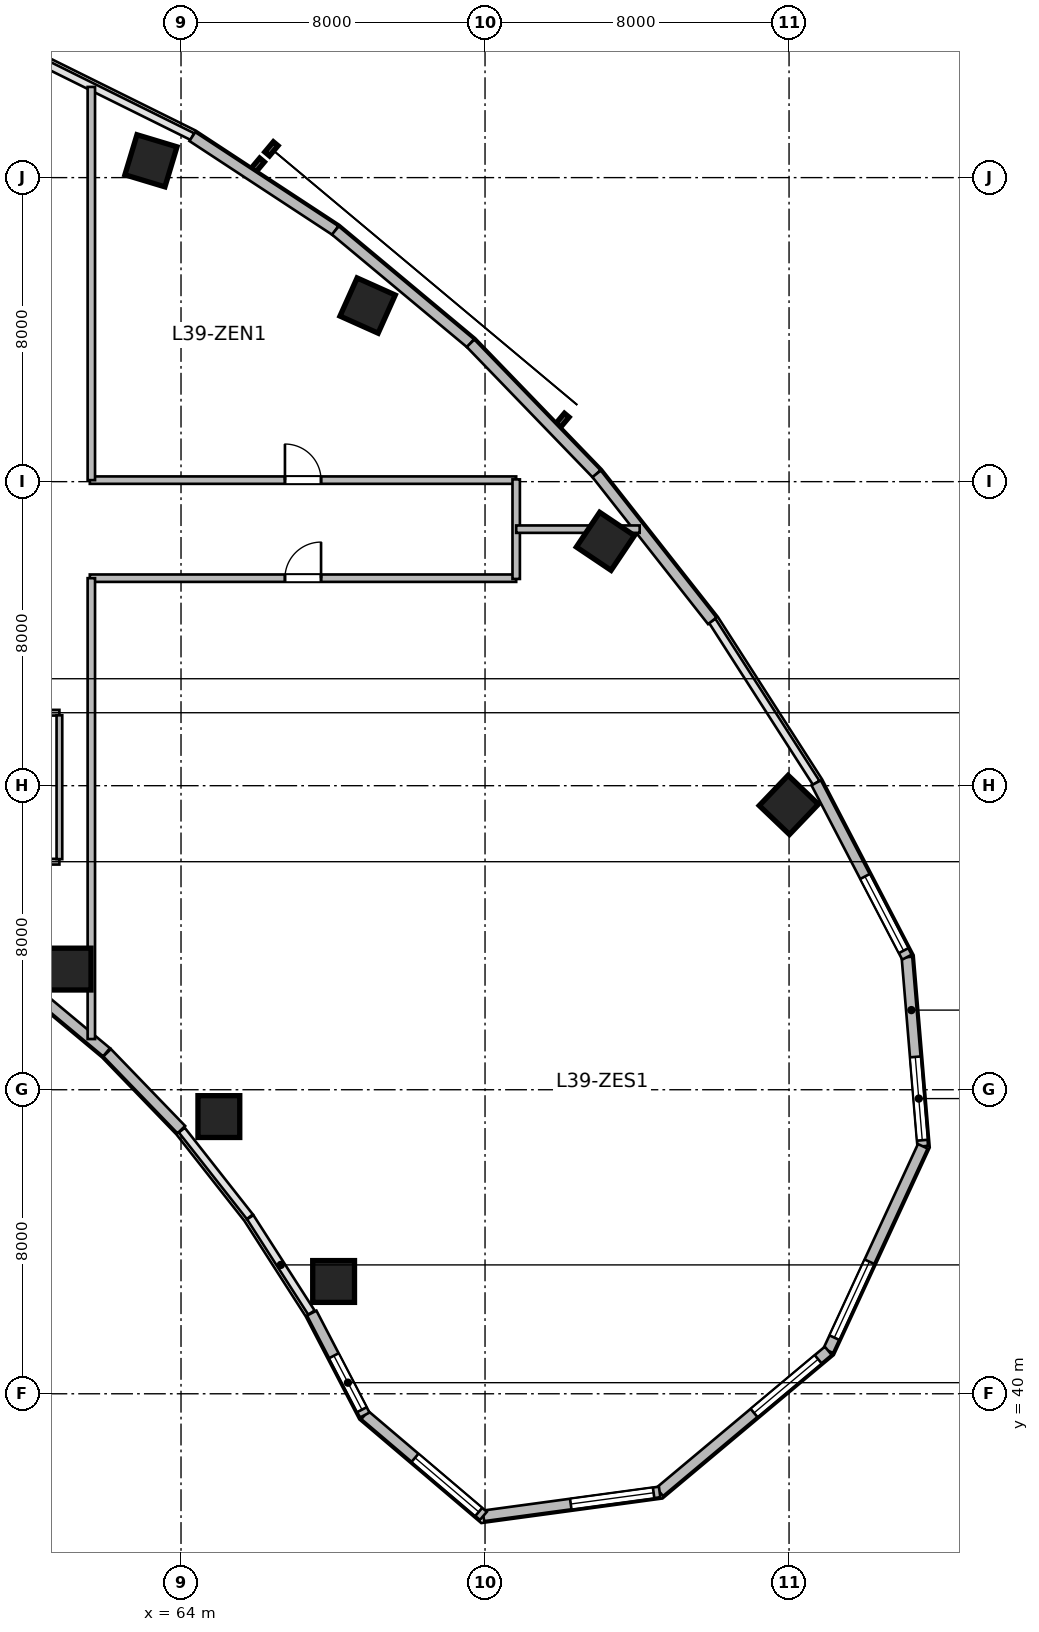
"""IFC4 building model, lengths in metres.
Left out: names, types, materials, properties, quantities, classifications, styles, units other than length and angle.
Written with IfcOpenShell. Run it as: python <this file> out.ifc"""

import sys

from ifc_helpers import new_model, si_unit, direction, frame, frame_2d, origin, origin_2d, place, context, subcontext, project, spatial, rectangle, circle, extrude, source, transform, mapped, element, fill, save


model = new_model("IFC4")
c1 = context("Model", 3, precision=1e-05, world=origin(), true_north=direction((0.0, 1.0)))
c2 = subcontext(c1, "Body", "Model", "MODEL_VIEW")
j1 = project(units=[si_unit("LENGTHUNIT", "METRE"), si_unit("PLANEANGLEUNIT", "RADIAN")], contexts=[c1])
p1 = place(None, origin())
s1 = spatial("IfcSite", under=j1, at=p1, CompositionType="ELEMENT")
p2 = place(p1, origin())
s2 = spatial("IfcBuilding", under=s1, at=p2, CompositionType="ELEMENT")
p3 = place(p2, frame((0.0, 0.0, 162.3)))
s3 = spatial("IfcBuildingStorey", under=s2, at=p3, CompositionType="ELEMENT", Elevation=162.3)
m1 = source(origin(), c2, "Body", "SweptSolid", [
    extrude(rectangle(XDim=1.1, YDim=1.1, at=origin_2d()), origin(), (0.0, 0.0, 1.0), 3.9),
])
p4 = place(p3, frame((63.209, 72.442, 0.0), z_axis=(0.0, 0.0, 1.0), x_axis=(0.288697611798, 0.957420330337, 0.0)))
e1 = element("IfcColumn", 1, at=p4, inside=s3, PredefinedType="COLUMN", context=c2, shape_type="MappedRepresentation", body=[
    mapped(m1, transform((0.0, 0.0, 0.0), scale=1.0)),
])
m2 = source(origin(), c2, "Body", "SweptSolid", [
    extrude(circle(Radius=0.55, at=origin_2d()), origin(), (0.0, 0.0, 1.0), 3.9),
])
p5 = place(p3, frame((61.082, 51.175, 0.0), z_axis=(0.0, 0.0, 1.0), x_axis=(0.409126902895, 0.912477494148, 0.0)))
e2 = element("IfcColumn", 2, at=p5, inside=s3, PredefinedType="COLUMN", context=c2, shape_type="MappedRepresentation", body=[
    mapped(m2, transform((0.0, 0.0, 0.0), scale=1.0)),
])
p6 = place(p3, frame((68.91, 68.633, 0.0), z_axis=(0.0, 0.0, 1.0), x_axis=(0.409126902895, 0.912477494148, 0.0)))
e3 = element("IfcColumn", 3, at=p6, inside=s3, PredefinedType="COLUMN", context=c2, shape_type="MappedRepresentation", body=[
    mapped(m1, transform((0.0, 0.0, 0.0), scale=1.0)),
])
p7 = place(p3, frame((64.996, 47.294, 0.0), z_axis=(0.0, 0.0, 1.0), x_axis=(0.55774510898, 0.830012285095, 0.0)))
e4 = element("IfcColumn", 4, at=p7, inside=s3, PredefinedType="COLUMN", context=c2, shape_type="MappedRepresentation", body=[
    mapped(m2, transform((0.0, 0.0, 0.0), scale=1.0)),
])
p8 = place(p3, frame((75.167, 62.43, 0.0), z_axis=(0.0, 0.0, 1.0), x_axis=(0.55774510898, 0.830012285095, 0.0)))
e5 = element("IfcColumn", 5, at=p8, inside=s3, PredefinedType="COLUMN", context=c2, shape_type="MappedRepresentation", body=[
    mapped(m1, transform((0.0, 0.0, 0.0), scale=1.0)),
])
p9 = place(p3, frame((68.015, 42.955, 0.0), z_axis=(0.0, 0.0, 1.0), x_axis=(0.690756218984, 0.723087716626, 0.0)))
e6 = element("IfcColumn", 6, at=p9, inside=s3, PredefinedType="COLUMN", context=c2, shape_type="MappedRepresentation", body=[
    mapped(m2, transform((0.0, 0.0, 0.0), scale=1.0)),
])
p10 = place(p3, frame((79.993, 55.494, 0.0), z_axis=(0.0, 0.0, 1.0), x_axis=(0.690756218984, 0.723087716626, 0.0)))
e7 = element("IfcColumn", 7, at=p10, inside=s3, PredefinedType="COLUMN", context=c2, shape_type="MappedRepresentation", body=[
    mapped(m1, transform((0.0, 0.0, 0.0), scale=1.0)),
])
m3 = source(origin(), c2, "Body", "SweptSolid", [
    extrude(rectangle(XDim=4.994, YDim=0.28, at=frame_2d((2.497, 0.0))), origin(), (0.0, 0.0, 1.0), 3.65),
])
p11 = place(p3, frame((83.102, 51.489, 0.0), z_axis=(0.0, 0.0, 1.0), x_axis=(0.083344839916, -0.996520766296, 0.0)))
e8 = element("IfcWall", 8, at=p11, inside=s3, PredefinedType="SOLIDWALL", context=c2, shape_type="MappedRepresentation", body=[
    mapped(m3, transform((0.0, 0.0, 0.0), scale=1.0)),
])
p12 = place(p11, frame((2.635, 0.0, 0.95)))
e9 = element("IfcOpeningElement", 9, at=p12, cuts=e8, PredefinedType="OPENING", context=c2, shape_type="SweptSolid", body=[
    extrude(rectangle(XDim=2.2, YDim=2.1, at=frame_2d((1.1, 1.05))), frame((0.0, 0.15, 0.0), z_axis=(0.0, -1.0, 0.0), x_axis=(1.0, 0.0, 0.0)), (0.0, 0.0, 1.0), 0.3),
])
m4 = source(origin(), c2, "Body", "SweptSolid", [
    extrude(rectangle(XDim=5.927, YDim=0.28, at=frame_2d((2.964, 0.0))), origin(), (0.0, 0.0, 1.0), 3.65),
])
p13 = place(p3, frame((83.519, 46.512, 0.0), z_axis=(0.0, 0.0, 1.0), x_axis=(-0.419656204795, -0.907683132914, 0.0)))
e10 = element("IfcWall", 10, at=p13, inside=s3, PredefinedType="SOLIDWALL", context=c2, shape_type="MappedRepresentation", body=[
    mapped(m4, transform((0.0, 0.0, 0.0), scale=1.0)),
])
p14 = place(p13, frame((3.346, 0.0, 0.95)))
e11 = element("IfcOpeningElement", 11, at=p14, cuts=e10, PredefinedType="OPENING", context=c2, shape_type="SweptSolid", body=[
    extrude(rectangle(XDim=2.2, YDim=2.1, at=frame_2d((1.1, 1.05))), frame((0.0, 0.15, 0.0), z_axis=(0.0, -1.0, 0.0), x_axis=(1.0, 0.0, 0.0)), (0.0, 0.0, 1.0), 0.3),
])
m5 = source(origin(), c2, "Body", "SweptSolid", [
    extrude(rectangle(XDim=5.786, YDim=0.28, at=frame_2d((2.893, 0.0))), origin(), (0.0, 0.0, 1.0), 3.65),
])
p15 = place(p3, frame((81.031, 41.131, 0.0), z_axis=(0.0, 0.0, 1.0), x_axis=(-0.766711306852, -0.641992034176, 0.0)))
e12 = element("IfcWall", 12, at=p15, inside=s3, PredefinedType="SOLIDWALL", context=c2, shape_type="MappedRepresentation", body=[
    mapped(m5, transform((0.0, 0.0, 0.0), scale=1.0)),
])
p16 = place(p15, frame((0.347, 0.0, 0.95)))
e13 = element("IfcOpeningElement", 13, at=p16, cuts=e12, PredefinedType="OPENING", context=c2, shape_type="SweptSolid", body=[
    extrude(rectangle(XDim=2.2, YDim=2.1, at=frame_2d((1.1, 1.05))), frame((0.0, 0.15, 0.0), z_axis=(0.0, -1.0, 0.0), x_axis=(1.0, 0.0, 0.0)), (0.0, 0.0, 1.0), 0.3),
])
m6 = source(origin(), c2, "Body", "SweptSolid", [
    extrude(rectangle(XDim=4.68, YDim=0.28, at=frame_2d((2.34, 0.0))), origin(), (0.0, 0.0, 1.0), 3.65),
])
p17 = place(p3, frame((76.594, 37.417, 0.0), z_axis=(0.0, 0.0, 1.0), x_axis=(-0.990931146435, -0.134370618162, 0.0)))
e14 = element("IfcWall", 14, at=p17, inside=s3, PredefinedType="SOLIDWALL", context=c2, shape_type="MappedRepresentation", body=[
    mapped(m6, transform((0.0, 0.0, 0.0), scale=1.0)),
])
p18 = place(p17, frame((0.16, 0.0, 0.95)))
e15 = element("IfcOpeningElement", 15, at=p18, cuts=e14, PredefinedType="OPENING", context=c2, shape_type="SweptSolid", body=[
    extrude(rectangle(XDim=2.2, YDim=2.1, at=frame_2d((1.1, 1.05))), frame((0.0, 0.15, 0.0), z_axis=(0.0, -1.0, 0.0), x_axis=(1.0, 0.0, 0.0)), (0.0, 0.0, 1.0), 0.3),
])
m7 = source(origin(), c2, "Body", "SweptSolid", [
    extrude(rectangle(XDim=4.096, YDim=0.28, at=frame_2d((2.048, 0.0))), origin(), (0.0, 0.0, 1.0), 3.65),
])
p19 = place(p3, frame((71.957, 36.788, 0.0), z_axis=(0.0, 0.0, 1.0), x_axis=(-0.761926081737, 0.647663991564, 0.0)))
e16 = element("IfcWall", 16, at=p19, inside=s3, PredefinedType="SOLIDWALL", context=c2, shape_type="MappedRepresentation", body=[
    mapped(m7, transform((0.0, 0.0, 0.0), scale=1.0)),
])
p20 = place(p19, frame((0.16, 0.0, 0.95)))
e17 = element("IfcOpeningElement", 17, at=p20, cuts=e16, PredefinedType="OPENING", context=c2, shape_type="SweptSolid", body=[
    extrude(rectangle(XDim=2.2, YDim=2.1, at=frame_2d((1.1, 1.05))), frame((0.0, 0.15, 0.0), z_axis=(0.0, -1.0, 0.0), x_axis=(1.0, 0.0, 0.0)), (0.0, 0.0, 1.0), 0.3),
])
m8 = source(origin(), c2, "Body", "SweptSolid", [
    extrude(rectangle(XDim=3.024, YDim=0.28, at=frame_2d((1.512, 0.0))), origin(), (0.0, 0.0, 1.0), 3.65),
])
p21 = place(p3, frame((68.836, 39.44, 0.0), z_axis=(0.0, 0.0, 1.0), x_axis=(-0.461718746531, 0.887026380161, 0.0)))
e18 = element("IfcWall", 18, at=p21, inside=s3, PredefinedType="SOLIDWALL", context=c2, shape_type="MappedRepresentation", body=[
    mapped(m8, transform((0.0, 0.0, 0.0), scale=1.0)),
])
p22 = place(p21, frame((0.16, 0.0, 0.95)))
e19 = element("IfcOpeningElement", 19, at=p22, cuts=e18, PredefinedType="OPENING", context=c2, shape_type="SweptSolid", body=[
    extrude(rectangle(XDim=1.6, YDim=1.9, at=frame_2d((0.8, 0.95))), frame((0.0, 0.15, 0.0), z_axis=(0.0, -1.0, 0.0), x_axis=(1.0, 0.0, 0.0)), (0.0, 0.0, 1.0), 0.3),
])
m9 = source(origin(), c2, "Body", "SweptSolid", [
    extrude(rectangle(XDim=2.812, YDim=0.28, at=frame_2d((1.406, 0.0))), origin(), (0.0, 0.0, 1.0), 3.65),
])
p23 = place(p3, frame((64.008, 46.95, 0.0), z_axis=(0.0, 0.0, 1.0), x_axis=(-0.694583668785, 0.719411931411, 0.0)))
e20 = element("IfcWall", 20, at=p23, inside=s3, PredefinedType="SOLIDWALL", context=c2, shape_type="MappedRepresentation", body=[
    mapped(m9, transform((0.0, 0.0, 0.0), scale=1.0)),
])
m10 = source(origin(), c2, "Body", "SweptSolid", [
    extrude(rectangle(XDim=2.729, YDim=0.28, at=frame_2d((1.365, 0.0))), origin(), (0.0, 0.0, 1.0), 3.65),
])
p24 = place(p3, frame((62.041, 48.987, 0.0), z_axis=(0.0, 0.0, 1.0), x_axis=(-0.767957284255, 0.640501061326, 0.0)))
e21 = element("IfcWall", 21, at=p24, inside=s3, PredefinedType="SOLIDWALL", context=c2, shape_type="MappedRepresentation", body=[
    mapped(m10, transform((0.0, 0.0, 0.0), scale=1.0)),
])
m11 = source(origin(), c2, "Body", "SweptSolid", [
    extrude(rectangle(XDim=4.501, YDim=0.28, at=frame_2d((2.25, 0.0))), origin(), (0.0, 0.0, 1.0), 3.65),
])
p25 = place(p3, frame((64.298, 73.08, 0.0), z_axis=(0.0, 0.0, 1.0), x_axis=(0.835984920737, -0.548752414391, 0.0)))
e22 = element("IfcWall", 22, at=p25, inside=s3, PredefinedType="SOLIDWALL", context=c2, shape_type="MappedRepresentation", body=[
    mapped(m11, transform((0.0, 0.0, 0.0), scale=1.0)),
])
m12 = source(origin(), c2, "Body", "SweptSolid", [
    extrude(rectangle(XDim=4.634, YDim=0.28, at=frame_2d((2.317, 0.0))), origin(), (0.0, 0.0, 1.0), 3.65),
])
p26 = place(p3, frame((68.061, 70.61, 0.0), z_axis=(0.0, 0.0, 1.0), x_axis=(0.767910229096, -0.640557475993, 0.0)))
e23 = element("IfcWall", 23, at=p26, inside=s3, PredefinedType="SOLIDWALL", context=c2, shape_type="MappedRepresentation", body=[
    mapped(m12, transform((0.0, 0.0, 0.0), scale=1.0)),
])
m13 = source(origin(), c2, "Body", "SweptSolid", [
    extrude(rectangle(XDim=4.776, YDim=0.28, at=frame_2d((2.388, 0.0))), origin(), (0.0, 0.0, 1.0), 3.65),
])
p27 = place(p3, frame((71.619, 67.642, 0.0), z_axis=(0.0, 0.0, 1.0), x_axis=(0.694601811851, -0.719394414055, 0.0)))
e24 = element("IfcWall", 24, at=p27, inside=s3, PredefinedType="SOLIDWALL", context=c2, shape_type="MappedRepresentation", body=[
    mapped(m13, transform((0.0, 0.0, 0.0), scale=1.0)),
])
m14 = source(origin(), c2, "Body", "SweptSolid", [
    extrude(rectangle(XDim=4.922, YDim=0.28, at=frame_2d((2.461, 0.0))), origin(), (0.0, 0.0, 1.0), 3.65),
])
p28 = place(p3, frame((74.936, 64.206, 0.0), z_axis=(0.0, 0.0, 1.0), x_axis=(0.61817639101, -0.786039407153, 0.0)))
e25 = element("IfcWall", 25, at=p28, inside=s3, PredefinedType="SOLIDWALL", context=c2, shape_type="MappedRepresentation", body=[
    mapped(m14, transform((0.0, 0.0, 0.0), scale=1.0)),
])
m15 = source(origin(), c2, "Body", "SweptSolid", [
    extrude(rectangle(XDim=5.171, YDim=0.28, at=frame_2d((2.585, 0.0))), origin(), (0.0, 0.0, 1.0), 3.65),
])
p29 = place(p3, frame((80.715, 56.075, 0.0), z_axis=(0.0, 0.0, 1.0), x_axis=(0.461752581363, -0.887008767491, 0.0)))
e26 = element("IfcWall", 26, at=p29, inside=s3, PredefinedType="SOLIDWALL", context=c2, shape_type="MappedRepresentation", body=[
    mapped(m15, transform((0.0, 0.0, 0.0), scale=1.0)),
])
p30 = place(p29, frame((2.778, 0.0, 0.95)))
e27 = element("IfcOpeningElement", 27, at=p30, cuts=e26, PredefinedType="OPENING", context=c2, shape_type="SweptSolid", body=[
    extrude(rectangle(XDim=2.2, YDim=2.1, at=frame_2d((1.1, 1.05))), frame((0.0, 0.15, 0.0), z_axis=(0.0, -1.0, 0.0), x_axis=(1.0, 0.0, 0.0)), (0.0, 0.0, 1.0), 0.3),
])
m16 = source(origin(), c2, "Body", "SweptSolid", [
    extrude(rectangle(XDim=6.6, YDim=0.15, at=frame_2d((3.3, 0.0))), origin(), (0.0, 0.0, 1.0), 3.095),
])
p31 = place(p3, frame((54.2, 54.0, 0.0), z_axis=(0.0, 0.0, 1.0), x_axis=(1.0, 0.0, 0.0)))
e28 = element("IfcWall", 28, at=p31, inside=s3, PredefinedType="PARTITIONING", context=c2, shape_type="MappedRepresentation", body=[
    mapped(m16, transform((0.0, 0.0, 0.0), scale=1.0)),
])
m17 = source(origin(), c2, "Body", "SweptSolid", [
    extrude(rectangle(XDim=6.6, YDim=0.15, at=frame_2d((3.3, 0.0))), origin(), (0.0, 0.0, 1.0), 3.65),
])
p32 = place(p3, frame((54.2, 57.92, 0.0), z_axis=(0.0, 0.0, 1.0), x_axis=(1.0, 0.0, 0.0)))
e29 = element("IfcWall", 29, at=p32, inside=s3, PredefinedType="PARTITIONING", context=c2, shape_type="MappedRepresentation", body=[
    mapped(m17, transform((0.0, 0.0, 0.0), scale=1.0)),
])
p33 = place(p32, frame((2.825, 0.0, 0.0)))
e30 = element("IfcOpeningElement", 30, at=p33, cuts=e29, PredefinedType="OPENING", context=c2, shape_type="SweptSolid", body=[
    extrude(rectangle(XDim=0.95, YDim=2.1, at=frame_2d((0.475, 1.05))), frame((0.0, 0.085, 0.0), z_axis=(0.0, -1.0, 0.0), x_axis=(1.0, 0.0, 0.0)), (0.0, 0.0, 1.0), 0.17),
])
m18 = source(origin(), c2, "Body", "SweptSolid", [
    extrude(rectangle(XDim=3.785, YDim=0.15, at=frame_2d((1.893, 0.0))), origin(), (0.0, 0.0, 1.0), 3.65),
])
p34 = place(p3, frame((60.8, 54.067, 0.0), z_axis=(0.0, 0.0, 1.0), x_axis=(0.0, 1.0, 0.0)))
e31 = element("IfcWall", 31, at=p34, inside=s3, PredefinedType="PARTITIONING", context=c2, shape_type="MappedRepresentation", body=[
    mapped(m18, transform((0.0, 0.0, 0.0), scale=1.0)),
])
m19 = source(origin(), c2, "Body", "SweptSolid", [
    extrude(rectangle(XDim=11.22, YDim=0.195, at=frame_2d((5.61, 0.0))), origin(), (0.0, 0.0, 1.0), 3.65),
])
p35 = place(p3, frame((61.6, 64.04, 0.0), z_axis=(0.0, 0.0, 1.0), x_axis=(1.0, 0.0, 0.0)))
e32 = element("IfcWall", 32, at=p35, inside=s3, PredefinedType="PARTITIONING", context=c2, shape_type="MappedRepresentation", body=[
    mapped(m19, transform((0.0, 0.0, 0.0), scale=1.0)),
])
p36 = place(p35, frame((5.135, 0.0, 0.0)))
e33 = element("IfcOpeningElement", 33, at=p36, cuts=e32, PredefinedType="OPENING", context=c2, shape_type="SweptSolid", body=[
    extrude(rectangle(XDim=0.95, YDim=2.1, at=frame_2d((0.475, 1.05))), frame((0.0, 0.107, 0.0), z_axis=(0.0, -1.0, 0.0), x_axis=(1.0, 0.0, 0.0)), (0.0, 0.0, 1.0), 0.215),
])
p37 = place(p3, frame((61.6, 61.46, 0.0), z_axis=(0.0, 0.0, 1.0), x_axis=(1.0, 0.0, 0.0)))
e34 = element("IfcWall", 34, at=p37, inside=s3, PredefinedType="PARTITIONING", context=c2, shape_type="MappedRepresentation", body=[
    mapped(m19, transform((0.0, 0.0, 0.0), scale=1.0)),
])
p38 = place(p37, frame((5.135, 0.0, 0.0)))
e35 = element("IfcOpeningElement", 35, at=p38, cuts=e34, PredefinedType="OPENING", context=c2, shape_type="SweptSolid", body=[
    extrude(rectangle(XDim=0.95, YDim=2.1, at=frame_2d((0.475, 1.05))), frame((0.0, 0.107, 0.0), z_axis=(0.0, -1.0, 0.0), x_axis=(1.0, 0.0, 0.0)), (0.0, 0.0, 1.0), 0.215),
])
m20 = source(origin(), c2, "Body", "SweptSolid", [
    extrude(rectangle(XDim=12.126, YDim=0.195, at=frame_2d((6.063, 0.0))), origin(), (0.0, 0.0, 1.0), 2.942),
])
p39 = place(p3, frame((61.64, 49.334, 0.0), z_axis=(0.0, 0.0, 1.0), x_axis=(0.0, 1.0, 0.0)))
e36 = element("IfcWall", 36, at=p39, inside=s3, PredefinedType="PARTITIONING", context=c2, shape_type="MappedRepresentation", body=[
    mapped(m20, transform((0.0, 0.0, 0.0), scale=1.0)),
])
m21 = source(origin(), c2, "Body", "SweptSolid", [
    extrude(rectangle(XDim=10.346, YDim=0.195, at=frame_2d((5.173, 0.0))), origin(), (0.0, 0.0, 1.0), 3.65),
])
p40 = place(p3, frame((61.64, 64.04, 0.0), z_axis=(0.0, 0.0, 1.0), x_axis=(0.0, 1.0, 0.0)))
e37 = element("IfcWall", 37, at=p40, inside=s3, PredefinedType="PARTITIONING", context=c2, shape_type="MappedRepresentation", body=[
    mapped(m21, transform((0.0, 0.0, 0.0), scale=1.0)),
])
m22 = source(origin(), c2, "Body", "SweptSolid", [
    extrude(rectangle(XDim=2.62, YDim=0.195, at=frame_2d((1.31, 0.0))), origin(), (0.0, 0.0, 1.0), 3.022),
])
p41 = place(p3, frame((72.82, 61.44, 0.0), z_axis=(0.0, 0.0, 1.0), x_axis=(0.0, 1.0, 0.0)))
e38 = element("IfcWall", 38, at=p41, inside=s3, PredefinedType="PARTITIONING", context=c2, shape_type="MappedRepresentation", body=[
    mapped(m22, transform((0.0, 0.0, 0.0), scale=1.0)),
])
m23 = source(origin(), c2, "Body", "SweptSolid", [
    extrude(rectangle(XDim=3.249, YDim=0.195, at=frame_2d((1.625, 0.0))), origin(), (0.0, 0.0, 1.0), 3.65),
])
p42 = place(p3, frame((72.82, 62.75, 0.0), z_axis=(0.0, 0.0, 1.0), x_axis=(1.0, 0.0, 0.0)))
e39 = element("IfcWall", 39, at=p42, inside=s3, PredefinedType="PARTITIONING", context=c2, shape_type="MappedRepresentation", body=[
    mapped(m23, transform((0.0, 0.0, 0.0), scale=1.0)),
])
m24 = source(origin(), c2, "Body", "SweptSolid", [
    extrude(rectangle(XDim=2.2, YDim=2.1, at=frame_2d((1.1, 1.05))), frame((0.0, 0.03, 0.0), z_axis=(0.0, -1.0, 0.0), x_axis=(1.0, 0.0, 0.0)), (0.0, 0.0, 1.0), 0.06),
])
p43 = place(p12, origin())
e40 = element("IfcWindow", 40, at=p43, inside=s3, PartitioningType="TRIPLE_PANEL_VERTICAL", PredefinedType="WINDOW", context=c2, shape_type="MappedRepresentation", body=[
    mapped(m24, transform((0.0, 0.0, 0.0), scale=1.0)),
])
fill(e9, e40)
p44 = place(p14, origin())
e41 = element("IfcWindow", 41, at=p44, inside=s3, PartitioningType="TRIPLE_PANEL_VERTICAL", PredefinedType="WINDOW", context=c2, shape_type="MappedRepresentation", body=[
    mapped(m24, transform((0.0, 0.0, 0.0), scale=1.0)),
])
fill(e11, e41)
p45 = place(p16, origin())
e42 = element("IfcWindow", 42, at=p45, inside=s3, PartitioningType="TRIPLE_PANEL_VERTICAL", PredefinedType="WINDOW", context=c2, shape_type="MappedRepresentation", body=[
    mapped(m24, transform((0.0, 0.0, 0.0), scale=1.0)),
])
fill(e13, e42)
p46 = place(p18, origin())
e43 = element("IfcWindow", 43, at=p46, inside=s3, PartitioningType="TRIPLE_PANEL_VERTICAL", PredefinedType="WINDOW", context=c2, shape_type="MappedRepresentation", body=[
    mapped(m24, transform((0.0, 0.0, 0.0), scale=1.0)),
])
fill(e15, e43)
p47 = place(p20, origin())
e44 = element("IfcWindow", 44, at=p47, inside=s3, PartitioningType="TRIPLE_PANEL_VERTICAL", PredefinedType="WINDOW", context=c2, shape_type="MappedRepresentation", body=[
    mapped(m24, transform((0.0, 0.0, 0.0), scale=1.0)),
])
fill(e17, e44)
m25 = source(origin(), c2, "Body", "SweptSolid", [
    extrude(rectangle(XDim=1.6, YDim=1.9, at=frame_2d((0.8, 0.95))), frame((0.0, 0.03, 0.0), z_axis=(0.0, -1.0, 0.0), x_axis=(1.0, 0.0, 0.0)), (0.0, 0.0, 1.0), 0.06),
])
p48 = place(p22, origin())
e45 = element("IfcWindow", 45, at=p48, inside=s3, PartitioningType="SINGLE_PANEL", PredefinedType="WINDOW", context=c2, shape_type="MappedRepresentation", body=[
    mapped(m25, transform((0.0, 0.0, 0.0), scale=1.0)),
])
fill(e19, e45)
p49 = place(p30, origin())
e46 = element("IfcWindow", 46, at=p49, inside=s3, PartitioningType="TRIPLE_PANEL_VERTICAL", PredefinedType="WINDOW", context=c2, shape_type="MappedRepresentation", body=[
    mapped(m24, transform((0.0, 0.0, 0.0), scale=1.0)),
])
fill(e27, e46)
m26 = source(origin(), c2, "Body", "SweptSolid", [
    extrude(rectangle(XDim=0.95, YDim=2.1, at=frame_2d((0.475, 1.05))), frame((0.0, 0.025, 0.0), z_axis=(0.0, -1.0, 0.0), x_axis=(1.0, 0.0, 0.0)), (0.0, 0.0, 1.0), 0.05),
])
p50 = place(p36, origin())
e47 = element("IfcDoor", 47, at=p50, inside=s3, OperationType="SINGLE_SWING_LEFT", PredefinedType="DOOR", context=c2, shape_type="MappedRepresentation", body=[
    mapped(m26, transform((0.0, 0.0, 0.0), scale=1.0)),
])
fill(e33, e47)
p51 = place(p38, origin())
e48 = element("IfcDoor", 48, at=p51, inside=s3, OperationType="SINGLE_SWING_RIGHT", PredefinedType="DOOR", context=c2, shape_type="MappedRepresentation", body=[
    mapped(m26, transform((0.0, 0.0, 0.0), scale=1.0)),
])
fill(e35, e48)
save(model, sys.argv[1])
